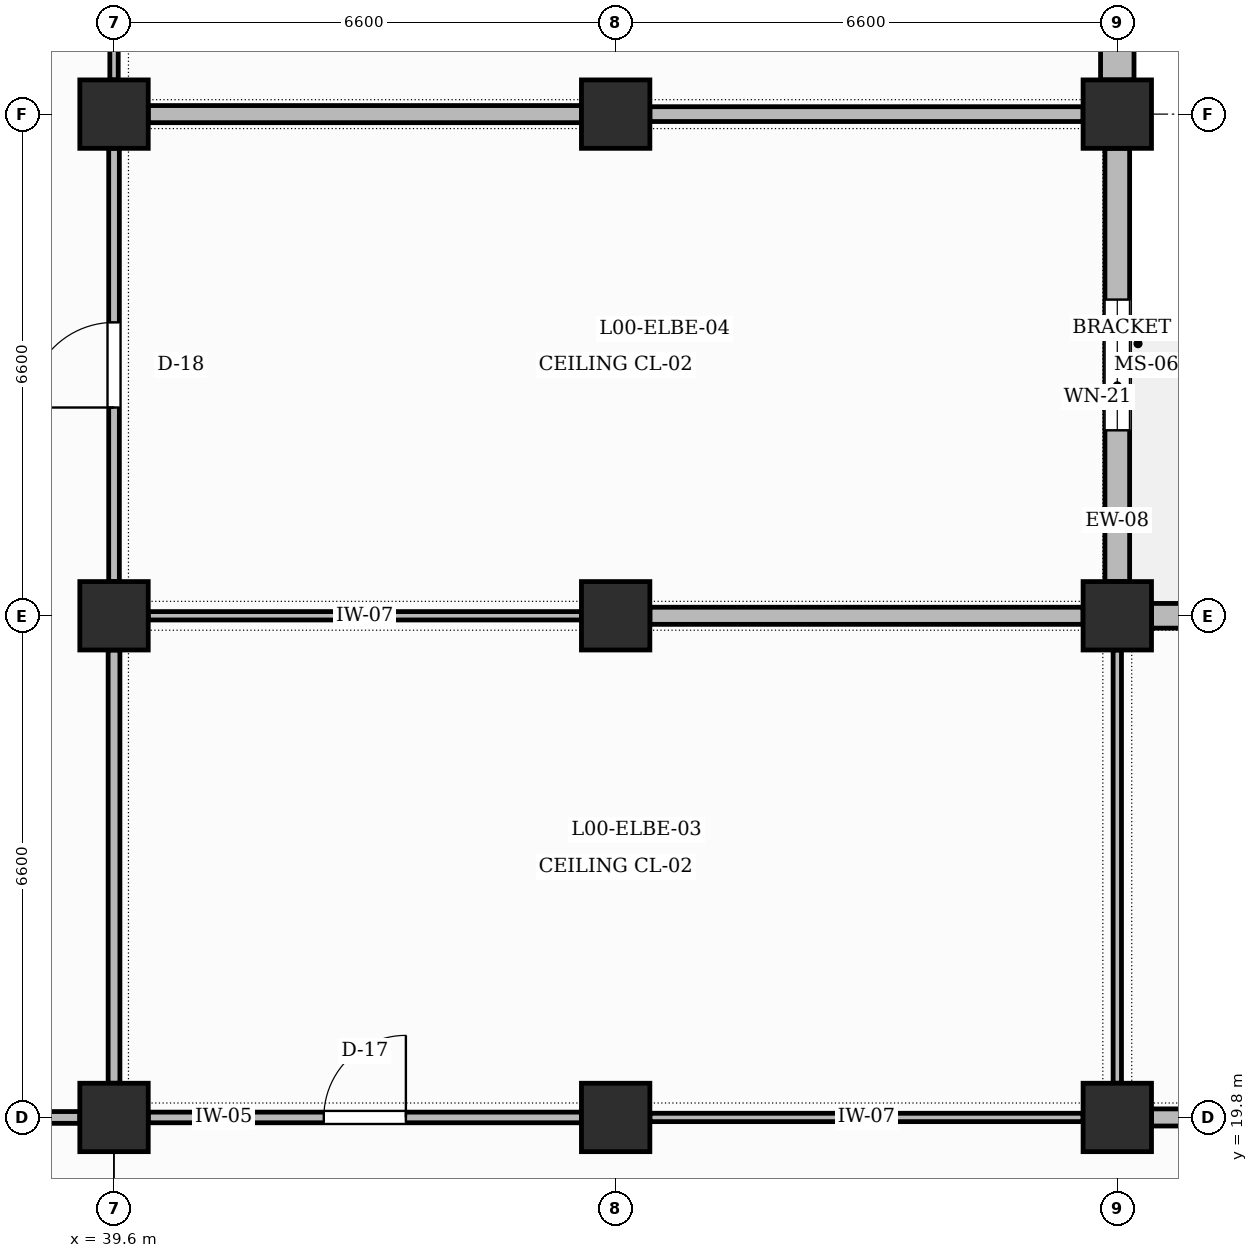
"""IFC4 building model, lengths in metres.
Left out: names, types, materials, properties, quantities, classifications, styles, units other than length and angle.
Written with IfcOpenShell. Run it as: python <this file> out.ifc"""

import sys

from ifc_helpers import new_model, si_unit, direction, frame, frame_2d, origin, origin_2d, place, context, subcontext, project, spatial, rectangle, extrude, element, fill, save


model = new_model("IFC4")
c1 = context("Model", 3, precision=1e-05, world=origin(), true_north=direction((0.0, 1.0)))
c2 = subcontext(c1, "Body", "Model", "MODEL_VIEW")
j1 = project(units=[si_unit("LENGTHUNIT", "METRE"), si_unit("PLANEANGLEUNIT", "RADIAN")], contexts=[c1])
p1 = place(None, origin())
s1 = spatial("IfcSite", under=j1, at=p1, CompositionType="ELEMENT")
p2 = place(p1, origin())
s2 = spatial("IfcBuilding", under=s1, at=p2, CompositionType="ELEMENT")
p3 = place(p2, origin())
s3 = spatial("IfcBuildingStorey", under=s2, at=p3, CompositionType="ELEMENT", Elevation=0.0)
for number, where, z_axis, x_axis in (
    (1, (39.6, 19.8, 0.0), (0.0, 0.0, 1.0), (1.0, 0.0, 0.0)),
    (2, (39.6, 26.4, 0.0), (0.0, 0.0, 1.0), (1.0, 0.0, 0.0)),
    (3, (39.6, 33.0, 0.0), (0.0, 0.0, 1.0), (1.0, 0.0, 0.0)),
    (4, (46.2, 19.8, 0.0), (0.0, 0.0, 1.0), (1.0, 0.0, 0.0)),
    (5, (46.2, 26.4, 0.0), (0.0, 0.0, 1.0), (1.0, 0.0, 0.0)),
    (6, (46.2, 33.0, 0.0), (0.0, 0.0, 1.0), (1.0, 0.0, 0.0)),
    (7, (52.8, 19.8, 0.0), (0.0, 0.0, 1.0), (1.0, 0.0, 0.0)),
    (8, (52.8, 26.4, 0.0), (0.0, 0.0, 1.0), (1.0, 0.0, 0.0)),
    (9, (52.8, 33.0, 0.0), (0.0, 0.0, 1.0), (1.0, 0.0, 0.0)),
):
    element("IfcColumn", number, at=place(p3, frame(where, z_axis=z_axis, x_axis=x_axis)), inside=s3, PredefinedType="COLUMN", context=c2, shape_type="SweptSolid", body=[
        extrude(rectangle(XDim=0.9, YDim=0.9, at=origin_2d()), origin(), (0.0, 0.0, 1.0), 5.4),
    ])
p4 = place(p3, frame((52.8, 26.85, 0.0), z_axis=(0.0, 0.0, 1.0), x_axis=(0.0, 1.0, 0.0)))
e10 = element("IfcWall", 10, at=p4, inside=s3, PredefinedType="SOLIDWALL", context=c2, shape_type="SweptSolid", body=[
    extrude(rectangle(XDim=5.7, YDim=0.325, at=frame_2d((2.85, 0.0))), origin(), (0.0, 0.0, 1.0), 4.45),
])
p5 = place(p4, frame((1.99, 0.0, 0.95)))
e11 = element("IfcOpeningElement", 11, at=p5, cuts=e10, PredefinedType="OPENING", context=c2, shape_type="SweptSolid", body=[
    extrude(rectangle(XDim=1.72, YDim=1.3, at=frame_2d((0.86, 0.65))), frame((0.0, 0.172, 0.0), z_axis=(0.0, -1.0, 0.0), x_axis=(1.0, 0.0, 0.0)), (0.0, 0.0, 1.0), 0.345),
])
p6 = place(p3, frame((52.8, 33.45, 0.0), z_axis=(0.0, 0.0, 1.0), x_axis=(0.0, 1.0, 0.0)))
e12 = element("IfcWall", 12, at=p6, inside=s3, PredefinedType="SOLIDWALL", context=c2, shape_type="SweptSolid", body=[
    extrude(rectangle(XDim=5.7, YDim=0.44, at=frame_2d((2.85, 0.0))), origin(), (0.0, 0.0, 1.0), 4.45),
])
p7 = place(p6, frame((1.99, 0.0, 0.95)))
e13 = element("IfcOpeningElement", 13, at=p7, cuts=e12, PredefinedType="OPENING", context=c2, shape_type="SweptSolid", body=[
    extrude(rectangle(XDim=1.72, YDim=1.52, at=frame_2d((0.86, 0.76))), frame((0.0, 0.23, 0.0), z_axis=(0.0, -1.0, 0.0), x_axis=(1.0, 0.0, 0.0)), (0.0, 0.0, 1.0), 0.46),
])
p8 = place(p3, frame((53.25, 26.4, 0.0), z_axis=(0.0, 0.0, 1.0), x_axis=(1.0, 0.0, 0.0)))
e14 = element("IfcWall", 14, at=p8, inside=s3, PredefinedType="SOLIDWALL", context=c2, shape_type="SweptSolid", body=[
    extrude(rectangle(XDim=5.7, YDim=0.325, at=frame_2d((2.85, 0.0))), origin(), (0.0, 0.0, 1.0), 4.45),
])
p9 = place(p8, frame((1.87, 0.0, 0.95)))
e15 = element("IfcOpeningElement", 15, at=p9, cuts=e14, PredefinedType="OPENING", context=c2, shape_type="SweptSolid", body=[
    extrude(rectangle(XDim=1.96, YDim=1.3, at=frame_2d((0.98, 0.65))), frame((0.0, 0.172, 0.0), z_axis=(0.0, -1.0, 0.0), x_axis=(1.0, 0.0, 0.0)), (0.0, 0.0, 1.0), 0.345),
])
p10 = place(p3, frame((33.475, 19.8, 0.0), z_axis=(0.0, 0.0, 1.0), x_axis=(1.0, 0.0, 0.0)))
e16 = element("IfcWall", 16, at=p10, inside=s3, PredefinedType="PARTITIONING", context=c2, shape_type="SweptSolid", body=[
    extrude(rectangle(XDim=5.675, YDim=0.155, at=frame_2d((2.837, 0.0))), origin(), (0.0, 0.0, 1.0), 4.2),
])
p11 = place(p10, frame((1.925, 0.0, 0.0)))
e17 = element("IfcOpeningElement", 17, at=p11, cuts=e16, PredefinedType="OPENING", context=c2, shape_type="SweptSolid", body=[
    extrude(rectangle(XDim=1.8, YDim=2.3, at=frame_2d((0.9, 1.15))), frame((0.0, 0.087, 0.0), z_axis=(0.0, -1.0, 0.0), x_axis=(1.0, 0.0, 0.0)), (0.0, 0.0, 1.0), 0.175),
])
p12 = place(p3, frame((39.6, 20.25, 0.0), z_axis=(0.0, 0.0, 1.0), x_axis=(0.0, 1.0, 0.0)))
e18 = element("IfcWall", 18, at=p12, inside=s3, PredefinedType="PARTITIONING", context=c2, shape_type="SweptSolid", body=[
    extrude(rectangle(XDim=5.7, YDim=0.155, at=frame_2d((2.85, 0.0))), origin(), (0.0, 0.0, 1.0), 4.3),
])
p13 = place(p3, frame((39.6, 26.85, 0.0), z_axis=(0.0, 0.0, 1.0), x_axis=(0.0, 1.0, 0.0)))
e19 = element("IfcWall", 19, at=p13, inside=s3, PredefinedType="PARTITIONING", context=c2, shape_type="SweptSolid", body=[
    extrude(rectangle(XDim=5.7, YDim=0.14, at=frame_2d((2.85, 0.0))), origin(), (0.0, 0.0, 1.0), 4.3),
])
p14 = place(p13, frame((2.29, 0.0, 0.0)))
e20 = element("IfcOpeningElement", 20, at=p14, cuts=e19, PredefinedType="OPENING", context=c2, shape_type="SweptSolid", body=[
    extrude(rectangle(XDim=1.12, YDim=2.2, at=frame_2d((0.56, 1.1))), frame((0.0, 0.08, 0.0), z_axis=(0.0, -1.0, 0.0), x_axis=(1.0, 0.0, 0.0)), (0.0, 0.0, 1.0), 0.16),
])
p15 = place(p3, frame((39.6, 33.45, 0.0), z_axis=(0.0, 0.0, 1.0), x_axis=(0.0, 1.0, 0.0)))
e21 = element("IfcWall", 21, at=p15, inside=s3, PredefinedType="PARTITIONING", context=c2, shape_type="SweptSolid", body=[
    extrude(rectangle(XDim=5.7, YDim=0.11, at=frame_2d((2.85, 0.0))), origin(), (0.0, 0.0, 1.0), 4.3),
])
p16 = place(p15, frame((2.26, 0.0, 0.0)))
e22 = element("IfcOpeningElement", 22, at=p16, cuts=e21, PredefinedType="OPENING", context=c2, shape_type="SweptSolid", body=[
    extrude(rectangle(XDim=1.18, YDim=2.2, at=frame_2d((0.59, 1.1))), frame((0.0, 0.065, 0.0), z_axis=(0.0, -1.0, 0.0), x_axis=(1.0, 0.0, 0.0)), (0.0, 0.0, 1.0), 0.13),
])
p17 = place(p3, frame((40.05, 19.8, 0.0), z_axis=(0.0, 0.0, 1.0), x_axis=(1.0, 0.0, 0.0)))
e23 = element("IfcWall", 23, at=p17, inside=s3, PredefinedType="PARTITIONING", context=c2, shape_type="SweptSolid", body=[
    extrude(rectangle(XDim=5.7, YDim=0.14, at=frame_2d((2.85, 0.0))), origin(), (0.0, 0.0, 1.0), 4.3),
])
p18 = place(p17, frame((2.31, 0.0, 0.0)))
e24 = element("IfcOpeningElement", 24, at=p18, cuts=e23, PredefinedType="OPENING", context=c2, shape_type="SweptSolid", body=[
    extrude(rectangle(XDim=1.08, YDim=2.15, at=frame_2d((0.54, 1.075))), frame((0.0, 0.08, 0.0), z_axis=(0.0, -1.0, 0.0), x_axis=(1.0, 0.0, 0.0)), (0.0, 0.0, 1.0), 0.16),
])
p19 = place(p3, frame((40.05, 26.4, 0.0), z_axis=(0.0, 0.0, 1.0), x_axis=(1.0, 0.0, 0.0)))
e25 = element("IfcWall", 25, at=p19, inside=s3, PredefinedType="PARTITIONING", context=c2, shape_type="SweptSolid", body=[
    extrude(rectangle(XDim=5.7, YDim=0.11, at=frame_2d((2.85, 0.0))), origin(), (0.0, 0.0, 1.0), 4.2),
])
p20 = place(p3, frame((40.05, 33.0, 0.0), z_axis=(0.0, 0.0, 1.0), x_axis=(1.0, 0.0, 0.0)))
e26 = element("IfcWall", 26, at=p20, inside=s3, PredefinedType="PARTITIONING", context=c2, shape_type="SweptSolid", body=[
    extrude(rectangle(XDim=5.7, YDim=0.225, at=frame_2d((2.85, 0.0))), origin(), (0.0, 0.0, 1.0), 4.3),
])
p21 = place(p3, frame((46.65, 19.8, 0.0), z_axis=(0.0, 0.0, 1.0), x_axis=(1.0, 0.0, 0.0)))
e27 = element("IfcWall", 27, at=p21, inside=s3, PredefinedType="PARTITIONING", context=c2, shape_type="SweptSolid", body=[
    extrude(rectangle(XDim=5.7, YDim=0.11, at=frame_2d((2.85, 0.0))), origin(), (0.0, 0.0, 1.0), 4.2),
])
p22 = place(p3, frame((52.8, 20.25, 0.0), z_axis=(0.0, 0.0, 1.0), x_axis=(0.0, 1.0, 0.0)))
e28 = element("IfcWall", 28, at=p22, inside=s3, PredefinedType="PARTITIONING", context=c2, shape_type="SweptSolid", body=[
    extrude(rectangle(XDim=5.7, YDim=0.11, at=frame_2d((2.85, 0.0))), origin(), (0.0, 0.0, 1.0), 4.3),
])
p23 = place(p3, frame((46.65, 26.4, 0.0), z_axis=(0.0, 0.0, 1.0), x_axis=(1.0, 0.0, 0.0)))
e29 = element("IfcWall", 29, at=p23, inside=s3, PredefinedType="PARTITIONING", context=c2, shape_type="SweptSolid", body=[
    extrude(rectangle(XDim=5.7, YDim=0.225, at=frame_2d((2.85, 0.0))), origin(), (0.0, 0.0, 1.0), 4.3),
])
p24 = place(p3, frame((46.65, 33.0, 0.0), z_axis=(0.0, 0.0, 1.0), x_axis=(1.0, 0.0, 0.0)))
e30 = element("IfcWall", 30, at=p24, inside=s3, PredefinedType="PARTITIONING", context=c2, shape_type="SweptSolid", body=[
    extrude(rectangle(XDim=5.7, YDim=0.195, at=frame_2d((2.85, 0.0))), origin(), (0.0, 0.0, 1.0), 4.2),
])
p25 = place(p3, frame((53.25, 19.8, 0.0), z_axis=(0.0, 0.0, 1.0), x_axis=(1.0, 0.0, 0.0)))
e31 = element("IfcWall", 31, at=p25, inside=s3, PredefinedType="PARTITIONING", context=c2, shape_type="SweptSolid", body=[
    extrude(rectangle(XDim=5.7, YDim=0.225, at=frame_2d((2.85, 0.0))), origin(), (0.0, 0.0, 1.0), 4.3),
])
p26 = place(p25, frame((2.325, 0.0, 0.0)))
e32 = element("IfcOpeningElement", 32, at=p26, cuts=e31, PredefinedType="OPENING", context=c2, shape_type="SweptSolid", body=[
    extrude(rectangle(XDim=1.05, YDim=2.15, at=frame_2d((0.525, 1.075))), frame((0.0, 0.123, 0.0), z_axis=(0.0, -1.0, 0.0), x_axis=(1.0, 0.0, 0.0)), (0.0, 0.0, 1.0), 0.245),
])
p27 = place(p5, origin())
e33 = element("IfcWindow", 33, at=p27, inside=s3, PartitioningType="DOUBLE_PANEL_VERTICAL", PredefinedType="WINDOW", context=c2, shape_type="SweptSolid", body=[
    extrude(rectangle(XDim=1.72, YDim=1.3, at=frame_2d((0.86, 0.65))), frame((0.0, 0.03, 0.0), z_axis=(0.0, -1.0, 0.0), x_axis=(1.0, 0.0, 0.0)), (0.0, 0.0, 1.0), 0.06),
])
fill(e11, e33)
p28 = place(p18, origin())
e34 = element("IfcDoor", 34, at=p28, inside=s3, OperationType="SINGLE_SWING_RIGHT", PredefinedType="DOOR", context=c2, shape_type="SweptSolid", body=[
    extrude(rectangle(XDim=1.08, YDim=2.15, at=frame_2d((0.54, 1.075))), frame((0.0, 0.025, 0.0), z_axis=(0.0, -1.0, 0.0), x_axis=(1.0, 0.0, 0.0)), (0.0, 0.0, 1.0), 0.05),
])
fill(e24, e34)
p29 = place(p14, origin())
e35 = element("IfcDoor", 35, at=p29, inside=s3, OperationType="SINGLE_SWING_LEFT", PredefinedType="DOOR", context=c2, shape_type="SweptSolid", body=[
    extrude(rectangle(XDim=1.12, YDim=2.2, at=frame_2d((0.56, 1.1))), frame((0.0, 0.025, 0.0), z_axis=(0.0, -1.0, 0.0), x_axis=(1.0, 0.0, 0.0)), (0.0, 0.0, 1.0), 0.05),
])
fill(e20, e35)
save(model, sys.argv[1])
